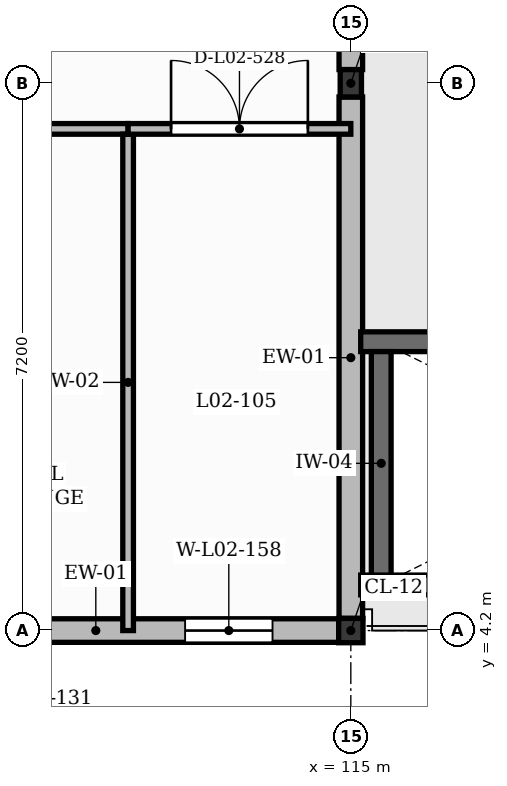
"""IFC4 building model, lengths in metres.
Left out: names, types, materials, properties, quantities, classifications, styles, units other than length and angle.
Written with IfcOpenShell. Run it as: python <this file> out.ifc"""

import sys

from ifc_helpers import new_model, si_unit, direction, frame, frame_2d, origin, origin_2d, place, context, subcontext, project, spatial, rectangle, extrude, element, fill, save


model = new_model("IFC4")
c1 = context("Model", 3, precision=1e-05, world=origin(), true_north=direction((0.0, 1.0)))
c2 = subcontext(c1, "Body", "Model", "MODEL_VIEW")
j1 = project(units=[si_unit("LENGTHUNIT", "METRE"), si_unit("PLANEANGLEUNIT", "RADIAN")], contexts=[c1])
p1 = place(None, origin())
s1 = spatial("IfcSite", under=j1, at=p1, CompositionType="ELEMENT")
p2 = place(p1, origin())
s2 = spatial("IfcBuilding", under=s1, at=p2, CompositionType="ELEMENT")
p3 = place(p2, frame((0.0, 0.0, 9.0)))
s3 = spatial("IfcBuildingStorey", under=s2, at=p3, CompositionType="ELEMENT", Elevation=9.0)
p4 = place(p3, frame((115.0, 4.2, 0.0), z_axis=(0.0, 0.0, 1.0), x_axis=(1.0, 0.0, 0.0)))
e1 = element("IfcColumn", 1, at=p4, inside=s3, PredefinedType="COLUMN", context=c2, shape_type="SweptSolid", body=[
    extrude(rectangle(XDim=0.32, YDim=0.32, at=origin_2d()), origin(), (0.0, 0.0, 1.0), 3.98),
])
p5 = place(p3, frame((115.0, 11.4, 0.0), z_axis=(0.0, 0.0, 1.0), x_axis=(1.0, 0.0, 0.0)))
e2 = element("IfcColumn", 2, at=p5, inside=s3, PredefinedType="COLUMN", context=c2, shape_type="SweptSolid", body=[
    extrude(rectangle(XDim=0.28, YDim=0.36, at=origin_2d()), origin(), (0.0, 0.0, 1.0), 3.98),
])
p6 = place(p3, frame((107.94, 4.2, 0.0), z_axis=(0.0, 0.0, 1.0), x_axis=(1.0, 0.0, 0.0)))
e3 = element("IfcWall", 3, at=p6, inside=s3, PredefinedType="SOLIDWALL", context=c2, shape_type="SweptSolid", body=[
    extrude(rectangle(XDim=6.9, YDim=0.31, at=frame_2d((3.45, 0.0))), origin(), (0.0, 0.0, 1.0), 3.52),
])
p7 = place(p6, frame((1.2, 0.0, 1.5)))
e4 = element("IfcOpeningElement", 4, at=p7, cuts=e3, PredefinedType="OPENING", context=c2, shape_type="SweptSolid", body=[
    extrude(rectangle(XDim=1.85, YDim=1.25, at=frame_2d((0.925, 0.625))), frame((0.0, 0.165, 0.0), z_axis=(0.0, -1.0, 0.0), x_axis=(1.0, 0.0, 0.0)), (0.0, 0.0, 1.0), 0.33),
])
p8 = place(p6, frame((4.88, 0.0, 1.5)))
e5 = element("IfcOpeningElement", 5, at=p8, cuts=e3, PredefinedType="OPENING", context=c2, shape_type="SweptSolid", body=[
    extrude(rectangle(XDim=1.15, YDim=1.25, at=frame_2d((0.575, 0.625))), frame((0.0, 0.165, 0.0), z_axis=(0.0, -1.0, 0.0), x_axis=(1.0, 0.0, 0.0)), (0.0, 0.0, 1.0), 0.33),
])
p9 = place(p3, frame((115.0, 4.36, 0.0), z_axis=(0.0, 0.0, 1.0), x_axis=(0.0, 1.0, 0.0)))
e6 = element("IfcWall", 6, at=p9, inside=s3, PredefinedType="SOLIDWALL", context=c2, shape_type="SweptSolid", body=[
    extrude(rectangle(XDim=6.86, YDim=0.31, at=frame_2d((3.43, 0.0))), origin(), (0.0, 0.0, 1.0), 3.52),
])
p10 = place(p3, frame((115.0, 11.58, 0.0), z_axis=(0.0, 0.0, 1.0), x_axis=(0.0, 1.0, 0.0)))
e7 = element("IfcWall", 7, at=p10, inside=s3, PredefinedType="SOLIDWALL", context=c2, shape_type="SweptSolid", body=[
    extrude(rectangle(XDim=6.86, YDim=0.31, at=frame_2d((3.43, 0.0))), origin(), (0.0, 0.0, 1.0), 3.52),
])
p11 = place(p10, frame((2.63, 0.0, 0.0)))
e8 = element("IfcOpeningElement", 8, at=p11, cuts=e7, PredefinedType="OPENING", context=c2, shape_type="SweptSolid", body=[
    extrude(rectangle(XDim=1.6, YDim=2.3, at=frame_2d((0.8, 1.15))), frame((0.0, 0.165, 0.0), z_axis=(0.0, -1.0, 0.0), x_axis=(1.0, 0.0, 0.0)), (0.0, 0.0, 1.0), 0.33),
])
p12 = place(p10, frame((4.845, 0.0, 1.0)))
e9 = element("IfcOpeningElement", 9, at=p12, cuts=e7, PredefinedType="OPENING", context=c2, shape_type="SweptSolid", body=[
    extrude(rectangle(XDim=1.34, YDim=1.95, at=frame_2d((0.67, 0.975))), frame((0.0, 0.165, 0.0), z_axis=(0.0, -1.0, 0.0), x_axis=(1.0, 0.0, 0.0)), (0.0, 0.0, 1.0), 0.33),
])
for number, where, z_axis, x_axis in (
    (10, (115.13, 4.8, 0.0), (0.0, 0.0, 1.0), (1.0, 0.0, 0.0)),
    (11, (115.13, 8.0, 0.0), (0.0, 0.0, 1.0), (1.0, 0.0, 0.0)),
):
    element("IfcWall", number, at=place(p3, frame(where, z_axis=z_axis, x_axis=x_axis)), inside=s3, PredefinedType="SHEAR", context=c2, shape_type="SweptSolid", body=[
        extrude(rectangle(XDim=6.8, YDim=0.26, at=frame_2d((3.4, 0.0))), origin(), (0.0, 0.0, 1.0), 3.95),
    ])
p13 = place(p3, frame((115.4, 4.93, 0.0), z_axis=(0.0, 0.0, 1.0), x_axis=(0.0, 1.0, 0.0)))
e12 = element("IfcWall", 12, at=p13, inside=s3, PredefinedType="SHEAR", context=c2, shape_type="SweptSolid", body=[
    extrude(rectangle(XDim=2.94, YDim=0.26, at=frame_2d((1.47, 0.0))), origin(), (0.0, 0.0, 1.0), 3.95),
])
p14 = place(p3, frame((107.8, 10.8, 0.0), z_axis=(0.0, 0.0, 1.0), x_axis=(1.0, 0.0, 0.0)))
e13 = element("IfcWall", 13, at=p14, inside=s3, PredefinedType="PARTITIONING", context=c2, shape_type="SweptSolid", body=[
    extrude(rectangle(XDim=4.27, YDim=0.14, at=frame_2d((2.135, 0.0))), origin(), (0.0, 0.0, 1.0), 3.96),
])
p15 = place(p14, frame((1.555, 0.0, 0.0)))
e14 = element("IfcOpeningElement", 14, at=p15, cuts=e13, PredefinedType="OPENING", context=c2, shape_type="SweptSolid", body=[
    extrude(rectangle(XDim=1.16, YDim=2.1, at=frame_2d((0.58, 1.05))), frame((0.0, 0.08, 0.0), z_axis=(0.0, -1.0, 0.0), x_axis=(1.0, 0.0, 0.0)), (0.0, 0.0, 1.0), 0.16),
])
p16 = place(p3, frame((112.07, 4.2, 0.0), z_axis=(0.0, 0.0, 1.0), x_axis=(0.0, 1.0, 0.0)))
e15 = element("IfcWall", 15, at=p16, inside=s3, PredefinedType="PARTITIONING", context=c2, shape_type="SweptSolid", body=[
    extrude(rectangle(XDim=6.53, YDim=0.14, at=frame_2d((3.265, 0.0))), origin(), (0.0, 0.0, 1.0), 3.96),
])
p17 = place(p3, frame((112.07, 10.8, 0.0), z_axis=(0.0, 0.0, 1.0), x_axis=(1.0, 0.0, 0.0)))
e16 = element("IfcWall", 16, at=p17, inside=s3, PredefinedType="PARTITIONING", context=c2, shape_type="SweptSolid", body=[
    extrude(rectangle(XDim=2.93, YDim=0.14, at=frame_2d((1.465, 0.0))), origin(), (0.0, 0.0, 1.0), 3.96),
])
p18 = place(p17, frame((0.565, 0.0, 0.0)))
e17 = element("IfcOpeningElement", 17, at=p18, cuts=e16, PredefinedType="OPENING", context=c2, shape_type="SweptSolid", body=[
    extrude(rectangle(XDim=1.8, YDim=2.3, at=frame_2d((0.9, 1.15))), frame((0.0, 0.08, 0.0), z_axis=(0.0, -1.0, 0.0), x_axis=(1.0, 0.0, 0.0)), (0.0, 0.0, 1.0), 0.16),
])
p19 = place(p8, origin())
e18 = element("IfcWindow", 18, at=p19, inside=s3, PartitioningType="SINGLE_PANEL", PredefinedType="WINDOW", context=c2, shape_type="SweptSolid", body=[
    extrude(rectangle(XDim=1.15, YDim=1.25, at=frame_2d((0.575, 0.625))), frame((0.0, 0.03, 0.0), z_axis=(0.0, -1.0, 0.0), x_axis=(1.0, 0.0, 0.0)), (0.0, 0.0, 1.0), 0.06),
])
fill(e5, e18)
p20 = place(p18, origin())
e19 = element("IfcDoor", 19, at=p20, inside=s3, OperationType="DOUBLE_DOOR_SINGLE_SWING", PredefinedType="DOOR", context=c2, shape_type="SweptSolid", body=[
    extrude(rectangle(XDim=1.8, YDim=2.3, at=frame_2d((0.9, 1.15))), frame((0.0, 0.025, 0.0), z_axis=(0.0, -1.0, 0.0), x_axis=(1.0, 0.0, 0.0)), (0.0, 0.0, 1.0), 0.05),
])
fill(e17, e19)
save(model, sys.argv[1])
